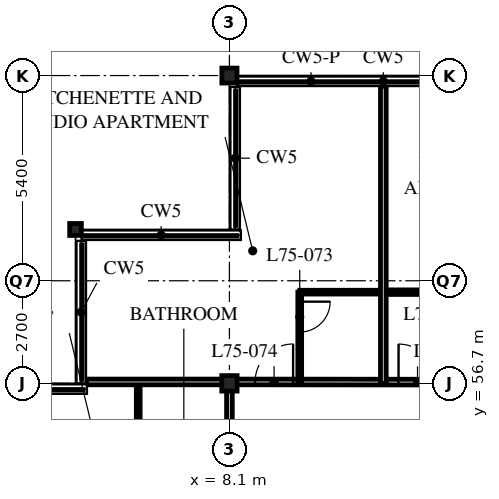
"""IFC4 building model, lengths in metres.
Left out: names, types, materials, properties, quantities, classifications, styles, units other than length and angle.
Written with IfcOpenShell. Run it as: python <this file> out.ifc"""

import sys

from ifc_helpers import new_model, si_unit, direction, frame, frame_2d, origin, origin_2d, place, context, subcontext, project, spatial, rectangle, i_section, extrude, element, fill, save


model = new_model("IFC4")
c1 = context("Model", 3, precision=1e-05, world=origin(), true_north=direction((0.0, 1.0)))
c2 = subcontext(c1, "Body", "Model", "MODEL_VIEW")
j1 = project(units=[si_unit("LENGTHUNIT", "METRE"), si_unit("PLANEANGLEUNIT", "RADIAN")], contexts=[c1])
p1 = place(None, origin())
s1 = spatial("IfcSite", under=j1, at=p1, CompositionType="ELEMENT")
p2 = place(p1, origin())
s2 = spatial("IfcBuilding", under=s1, at=p2, CompositionType="ELEMENT")
p3 = place(p2, frame((0.0, 0.0, 293.1)))
s3 = spatial("IfcBuildingStorey", under=s2, at=p3, CompositionType="ELEMENT", Elevation=293.1)
p4 = place(p3, frame((4.05, 60.75, 0.0), z_axis=(0.0, 0.0, 1.0), x_axis=(1.0, 0.0, 0.0)))
e1 = element("IfcColumn", 1, at=p4, inside=s3, PredefinedType="COLUMN", context=c2, shape_type="SweptSolid", body=[
    extrude(i_section(OverallWidth=0.307, OverallDepth=0.314, WebThickness=0.012, FlangeThickness=0.019, FilletRadius=0.015, at=origin_2d()), origin(), (0.0, 0.0, 1.0), 5.4),
])
p5 = place(p3, frame((8.1, 56.7, 0.0), z_axis=(0.0, 0.0, 1.0), x_axis=(1.0, 0.0, 0.0)))
e2 = element("IfcColumn", 2, at=p5, inside=s3, PredefinedType="COLUMN", context=c2, shape_type="SweptSolid", body=[
    extrude(i_section(OverallWidth=0.403, OverallDepth=0.406, WebThickness=0.027, FlangeThickness=0.043, FilletRadius=0.015, at=origin_2d()), origin(), (0.0, 0.0, 1.0), 5.4),
])
p6 = place(p3, frame((8.1, 64.8, 0.0), z_axis=(0.0, 0.0, 1.0), x_axis=(1.0, 0.0, 0.0)))
e3 = element("IfcColumn", 3, at=p6, inside=s3, PredefinedType="COLUMN", context=c2, shape_type="SweptSolid", body=[
    extrude(i_section(OverallWidth=0.399, OverallDepth=0.394, WebThickness=0.023, FlangeThickness=0.037, FilletRadius=0.015, at=origin_2d()), origin(), (0.0, 0.0, 1.0), 5.4),
])
p7 = place(p3, frame((8.1, 56.738, 0.0), z_axis=(0.0, 0.0, 1.0), x_axis=(0.999999569095, -0.000928336791, 0.0)))
e4 = element("IfcWall", 4, at=p7, inside=s3, PredefinedType="PARTITIONING", context=c2, shape_type="SweptSolid", body=[
    extrude(rectangle(XDim=40.5, YDim=0.15, at=frame_2d((20.25, 0.0))), origin(), (0.0, 0.0, 1.0), 4.271),
])
p8 = place(p7, frame((4.45, 0.0, 0.0)))
e5 = element("IfcOpeningElement", 5, at=p8, cuts=e4, PredefinedType="OPENING", context=c2, shape_type="SweptSolid", body=[
    extrude(rectangle(XDim=1.0, YDim=2.1, at=frame_2d((0.5, 1.05))), frame((0.0, 0.085, 0.0), z_axis=(0.0, -1.0, 0.0), x_axis=(1.0, 0.0, 0.0)), (0.0, 0.0, 1.0), 0.17),
])
p9 = place(p7, frame((12.55, 0.0, 0.0)))
e6 = element("IfcOpeningElement", 6, at=p9, cuts=e4, PredefinedType="OPENING", context=c2, shape_type="SweptSolid", body=[
    extrude(rectangle(XDim=1.0, YDim=2.1, at=frame_2d((0.5, 1.05))), frame((0.0, 0.085, 0.0), z_axis=(0.0, -1.0, 0.0), x_axis=(1.0, 0.0, 0.0)), (0.0, 0.0, 1.0), 0.17),
])
p10 = place(p7, frame((20.65, 0.0, 0.0)))
e7 = element("IfcOpeningElement", 7, at=p10, cuts=e4, PredefinedType="OPENING", context=c2, shape_type="SweptSolid", body=[
    extrude(rectangle(XDim=1.0, YDim=2.1, at=frame_2d((0.5, 1.05))), frame((0.0, 0.085, 0.0), z_axis=(0.0, -1.0, 0.0), x_axis=(1.0, 0.0, 0.0)), (0.0, 0.0, 1.0), 0.17),
])
p11 = place(p7, frame((28.75, 0.0, 0.0)))
e8 = element("IfcOpeningElement", 8, at=p11, cuts=e4, PredefinedType="OPENING", context=c2, shape_type="SweptSolid", body=[
    extrude(rectangle(XDim=1.0, YDim=2.1, at=frame_2d((0.5, 1.05))), frame((0.0, 0.085, 0.0), z_axis=(0.0, -1.0, 0.0), x_axis=(1.0, 0.0, 0.0)), (0.0, 0.0, 1.0), 0.17),
])
p12 = place(p7, frame((38.825, 0.0, 0.0)))
e9 = element("IfcOpeningElement", 9, at=p12, cuts=e4, PredefinedType="OPENING", context=c2, shape_type="SweptSolid", body=[
    extrude(rectangle(XDim=1.0, YDim=2.1, at=frame_2d((0.5, 1.05))), frame((0.0, 0.085, 0.0), z_axis=(0.0, -1.0, 0.0), x_axis=(1.0, 0.0, 0.0)), (0.0, 0.0, 1.0), 0.17),
])
p13 = place(p7, frame((0.675, 0.0, 0.0)))
e10 = element("IfcOpeningElement", 10, at=p13, cuts=e4, PredefinedType="OPENING", context=c2, shape_type="SweptSolid", body=[
    extrude(rectangle(XDim=1.0, YDim=2.1, at=frame_2d((0.5, 1.05))), frame((0.0, 0.085, 0.0), z_axis=(0.0, -1.0, 0.0), x_axis=(1.0, 0.0, 0.0)), (0.0, 0.0, 1.0), 0.17),
])
p14 = place(p3, frame((8.1, 22.5, 0.0), z_axis=(0.0, 0.0, 1.0), x_axis=(0.0, 1.0, 0.0)))
e11 = element("IfcWall", 11, at=p14, inside=s3, PredefinedType="PARTITIONING", context=c2, shape_type="SweptSolid", body=[
    extrude(rectangle(XDim=34.238, YDim=0.15, at=frame_2d((17.119, 0.0))), origin(), (0.0, 0.0, 1.0), 4.271),
])
p15 = place(p14, frame((2.675, 0.0, 0.0)))
e12 = element("IfcOpeningElement", 12, at=p15, cuts=e11, PredefinedType="OPENING", context=c2, shape_type="SweptSolid", body=[
    extrude(rectangle(XDim=1.0, YDim=2.1, at=frame_2d((0.5, 1.05))), frame((0.0, 0.085, 0.0), z_axis=(0.0, -1.0, 0.0), x_axis=(1.0, 0.0, 0.0)), (0.0, 0.0, 1.0), 0.17),
])
p16 = place(p14, frame((6.25, 0.0, 0.0)))
e13 = element("IfcOpeningElement", 13, at=p16, cuts=e11, PredefinedType="OPENING", context=c2, shape_type="SweptSolid", body=[
    extrude(rectangle(XDim=1.0, YDim=2.1, at=frame_2d((0.5, 1.05))), frame((0.0, 0.085, 0.0), z_axis=(0.0, -1.0, 0.0), x_axis=(1.0, 0.0, 0.0)), (0.0, 0.0, 1.0), 0.17),
])
p17 = place(p14, frame((14.35, 0.0, 0.0)))
e14 = element("IfcOpeningElement", 14, at=p17, cuts=e11, PredefinedType="OPENING", context=c2, shape_type="SweptSolid", body=[
    extrude(rectangle(XDim=1.0, YDim=2.1, at=frame_2d((0.5, 1.05))), frame((0.0, 0.085, 0.0), z_axis=(0.0, -1.0, 0.0), x_axis=(1.0, 0.0, 0.0)), (0.0, 0.0, 1.0), 0.17),
])
p18 = place(p14, frame((22.45, 0.0, 0.0)))
e15 = element("IfcOpeningElement", 15, at=p18, cuts=e11, PredefinedType="OPENING", context=c2, shape_type="SweptSolid", body=[
    extrude(rectangle(XDim=1.0, YDim=2.1, at=frame_2d((0.5, 1.05))), frame((0.0, 0.085, 0.0), z_axis=(0.0, -1.0, 0.0), x_axis=(1.0, 0.0, 0.0)), (0.0, 0.0, 1.0), 0.17),
])
p19 = place(p14, frame((30.85, 0.0, 0.0)))
e16 = element("IfcOpeningElement", 16, at=p19, cuts=e11, PredefinedType="OPENING", context=c2, shape_type="SweptSolid", body=[
    extrude(rectangle(XDim=1.0, YDim=2.1, at=frame_2d((0.5, 1.05))), frame((0.0, 0.085, 0.0), z_axis=(0.0, -1.0, 0.0), x_axis=(1.0, 0.0, 0.0)), (0.0, 0.0, 1.0), 0.17),
])
p20 = place(p3, frame((12.15, 59.1, 0.0), z_axis=(0.0, 0.0, 1.0), x_axis=(1.0, 0.0, 0.0)))
e17 = element("IfcWall", 17, at=p20, inside=s3, PredefinedType="PARTITIONING", context=c2, shape_type="SweptSolid", body=[
    extrude(rectangle(XDim=32.352, YDim=0.12, at=frame_2d((16.176, 0.0))), origin(), (0.0, 0.0, 1.0), 5.19),
])
p21 = place(p20, frame((0.975, 0.0, 0.0)))
e18 = element("IfcOpeningElement", 18, at=p21, cuts=e17, PredefinedType="OPENING", context=c2, shape_type="SweptSolid", body=[
    extrude(rectangle(XDim=0.85, YDim=2.1, at=frame_2d((0.425, 1.05))), frame((0.0, 0.07, 0.0), z_axis=(0.0, -1.0, 0.0), x_axis=(1.0, 0.0, 0.0)), (0.0, 0.0, 1.0), 0.14),
])
p22 = place(p20, frame((4.375, 0.0, 0.0)))
e19 = element("IfcOpeningElement", 19, at=p22, cuts=e17, PredefinedType="OPENING", context=c2, shape_type="SweptSolid", body=[
    extrude(rectangle(XDim=0.85, YDim=2.1, at=frame_2d((0.425, 1.05))), frame((0.0, 0.07, 0.0), z_axis=(0.0, -1.0, 0.0), x_axis=(1.0, 0.0, 0.0)), (0.0, 0.0, 1.0), 0.14),
])
p23 = place(p20, frame((9.075, 0.0, 0.0)))
e20 = element("IfcOpeningElement", 20, at=p23, cuts=e17, PredefinedType="OPENING", context=c2, shape_type="SweptSolid", body=[
    extrude(rectangle(XDim=0.85, YDim=2.1, at=frame_2d((0.425, 1.05))), frame((0.0, 0.07, 0.0), z_axis=(0.0, -1.0, 0.0), x_axis=(1.0, 0.0, 0.0)), (0.0, 0.0, 1.0), 0.14),
])
p24 = place(p20, frame((12.475, 0.0, 0.0)))
e21 = element("IfcOpeningElement", 21, at=p24, cuts=e17, PredefinedType="OPENING", context=c2, shape_type="SweptSolid", body=[
    extrude(rectangle(XDim=0.85, YDim=2.1, at=frame_2d((0.425, 1.05))), frame((0.0, 0.07, 0.0), z_axis=(0.0, -1.0, 0.0), x_axis=(1.0, 0.0, 0.0)), (0.0, 0.0, 1.0), 0.14),
])
p25 = place(p20, frame((17.175, 0.0, 0.0)))
e22 = element("IfcOpeningElement", 22, at=p25, cuts=e17, PredefinedType="OPENING", context=c2, shape_type="SweptSolid", body=[
    extrude(rectangle(XDim=0.85, YDim=2.1, at=frame_2d((0.425, 1.05))), frame((0.0, 0.07, 0.0), z_axis=(0.0, -1.0, 0.0), x_axis=(1.0, 0.0, 0.0)), (0.0, 0.0, 1.0), 0.14),
])
p26 = place(p20, frame((20.575, 0.0, 0.0)))
e23 = element("IfcOpeningElement", 23, at=p26, cuts=e17, PredefinedType="OPENING", context=c2, shape_type="SweptSolid", body=[
    extrude(rectangle(XDim=0.85, YDim=2.1, at=frame_2d((0.425, 1.05))), frame((0.0, 0.07, 0.0), z_axis=(0.0, -1.0, 0.0), x_axis=(1.0, 0.0, 0.0)), (0.0, 0.0, 1.0), 0.14),
])
p27 = place(p20, frame((25.275, 0.0, 0.0)))
e24 = element("IfcOpeningElement", 24, at=p27, cuts=e17, PredefinedType="OPENING", context=c2, shape_type="SweptSolid", body=[
    extrude(rectangle(XDim=0.85, YDim=2.1, at=frame_2d((0.425, 1.05))), frame((0.0, 0.07, 0.0), z_axis=(0.0, -1.0, 0.0), x_axis=(1.0, 0.0, 0.0)), (0.0, 0.0, 1.0), 0.14),
])
p28 = place(p20, frame((28.675, 0.0, 0.0)))
e25 = element("IfcOpeningElement", 25, at=p28, cuts=e17, PredefinedType="OPENING", context=c2, shape_type="SweptSolid", body=[
    extrude(rectangle(XDim=0.85, YDim=2.1, at=frame_2d((0.425, 1.05))), frame((0.0, 0.07, 0.0), z_axis=(0.0, -1.0, 0.0), x_axis=(1.0, 0.0, 0.0)), (0.0, 0.0, 1.0), 0.14),
])
p29 = place(p3, frame((5.7, 54.5, 0.0), z_axis=(0.0, 0.0, 1.0), x_axis=(0.0, 1.0, 0.0)))
e26 = element("IfcWall", 26, at=p29, inside=s3, PredefinedType="PARTITIONING", context=c2, shape_type="SweptSolid", body=[
    extrude(rectangle(XDim=2.238, YDim=0.1, at=frame_2d((1.119, 0.0))), origin(), (0.0, 0.0, 1.0), 5.19),
])
p30 = place(p3, frame((9.95, 59.1, 0.0), z_axis=(0.0, 0.0, 1.0), x_axis=(1.0, 0.0, 0.0)))
e27 = element("IfcWall", 27, at=p30, inside=s3, PredefinedType="PARTITIONING", context=c2, shape_type="SweptSolid", body=[
    extrude(rectangle(XDim=2.2, YDim=0.1, at=frame_2d((1.1, 0.0))), origin(), (0.0, 0.0, 1.0), 5.19),
])
p31 = place(p3, frame((9.95, 56.7, 0.0), z_axis=(0.0, 0.0, 1.0), x_axis=(0.0, 1.0, 0.0)))
e28 = element("IfcWall", 28, at=p31, inside=s3, PredefinedType="PARTITIONING", context=c2, shape_type="SweptSolid", body=[
    extrude(rectangle(XDim=2.4, YDim=0.1, at=frame_2d((1.2, 0.0))), origin(), (0.0, 0.0, 1.0), 5.19),
])
p32 = place(p31, frame((1.35, 0.0, 0.0)))
e29 = element("IfcOpeningElement", 29, at=p32, cuts=e28, PredefinedType="OPENING", context=c2, shape_type="SweptSolid", body=[
    extrude(rectangle(XDim=0.8, YDim=2.1, at=frame_2d((0.4, 1.05))), frame((0.0, 0.06, 0.0), z_axis=(0.0, -1.0, 0.0), x_axis=(1.0, 0.0, 0.0)), (0.0, 0.0, 1.0), 0.12),
])
p33 = place(p3, frame((4.328, 56.738, 0.0), z_axis=(0.0, 0.0, 1.0), x_axis=(1.0, 0.0, 0.0)))
e30 = element("IfcWall", 30, at=p33, inside=s3, PredefinedType="PARTITIONING", context=c2, shape_type="SweptSolid", body=[
    extrude(rectangle(XDim=3.772, YDim=0.15, at=frame_2d((1.886, 0.0))), origin(), (0.0, 0.0, 1.0), 4.271),
])
p34 = place(p3, frame((12.15, 56.7, 0.0), z_axis=(0.0, 0.0, 1.0), x_axis=(0.0, 1.0, 0.0)))
e31 = element("IfcWall", 31, at=p34, inside=s3, PredefinedType="PARTITIONING", context=c2, shape_type="SweptSolid", body=[
    extrude(rectangle(XDim=7.822, YDim=0.15, at=frame_2d((3.911, 0.0))), origin(), (0.0, 0.0, 1.0), 5.19),
])
p35 = place(p8, origin())
e32 = element("IfcDoor", 32, at=p35, inside=s3, OperationType="SINGLE_SWING_LEFT", PredefinedType="DOOR", context=c2, shape_type="SweptSolid", body=[
    extrude(rectangle(XDim=1.0, YDim=2.1, at=frame_2d((0.5, 1.05))), frame((0.0, 0.025, 0.0), z_axis=(0.0, -1.0, 0.0), x_axis=(1.0, 0.0, 0.0)), (0.0, 0.0, 1.0), 0.05),
])
fill(e5, e32)
p36 = place(p32, origin())
e33 = element("IfcDoor", 33, at=p36, inside=s3, OperationType="SINGLE_SWING_LEFT", PredefinedType="DOOR", context=c2, shape_type="SweptSolid", body=[
    extrude(rectangle(XDim=0.8, YDim=2.1, at=frame_2d((0.4, 1.05))), frame((0.0, 0.025, 0.0), z_axis=(0.0, -1.0, 0.0), x_axis=(1.0, 0.0, 0.0)), (0.0, 0.0, 1.0), 0.05),
])
fill(e29, e33)
p37 = place(p13, origin())
e34 = element("IfcDoor", 34, at=p37, inside=s3, OperationType="SINGLE_SWING_RIGHT", PredefinedType="DOOR", context=c2, shape_type="SweptSolid", body=[
    extrude(rectangle(XDim=1.0, YDim=2.1, at=frame_2d((0.5, 1.05))), frame((0.0, 0.025, 0.0), z_axis=(0.0, -1.0, 0.0), x_axis=(1.0, 0.0, 0.0)), (0.0, 0.0, 1.0), 0.05),
])
fill(e10, e34)
save(model, sys.argv[1])
